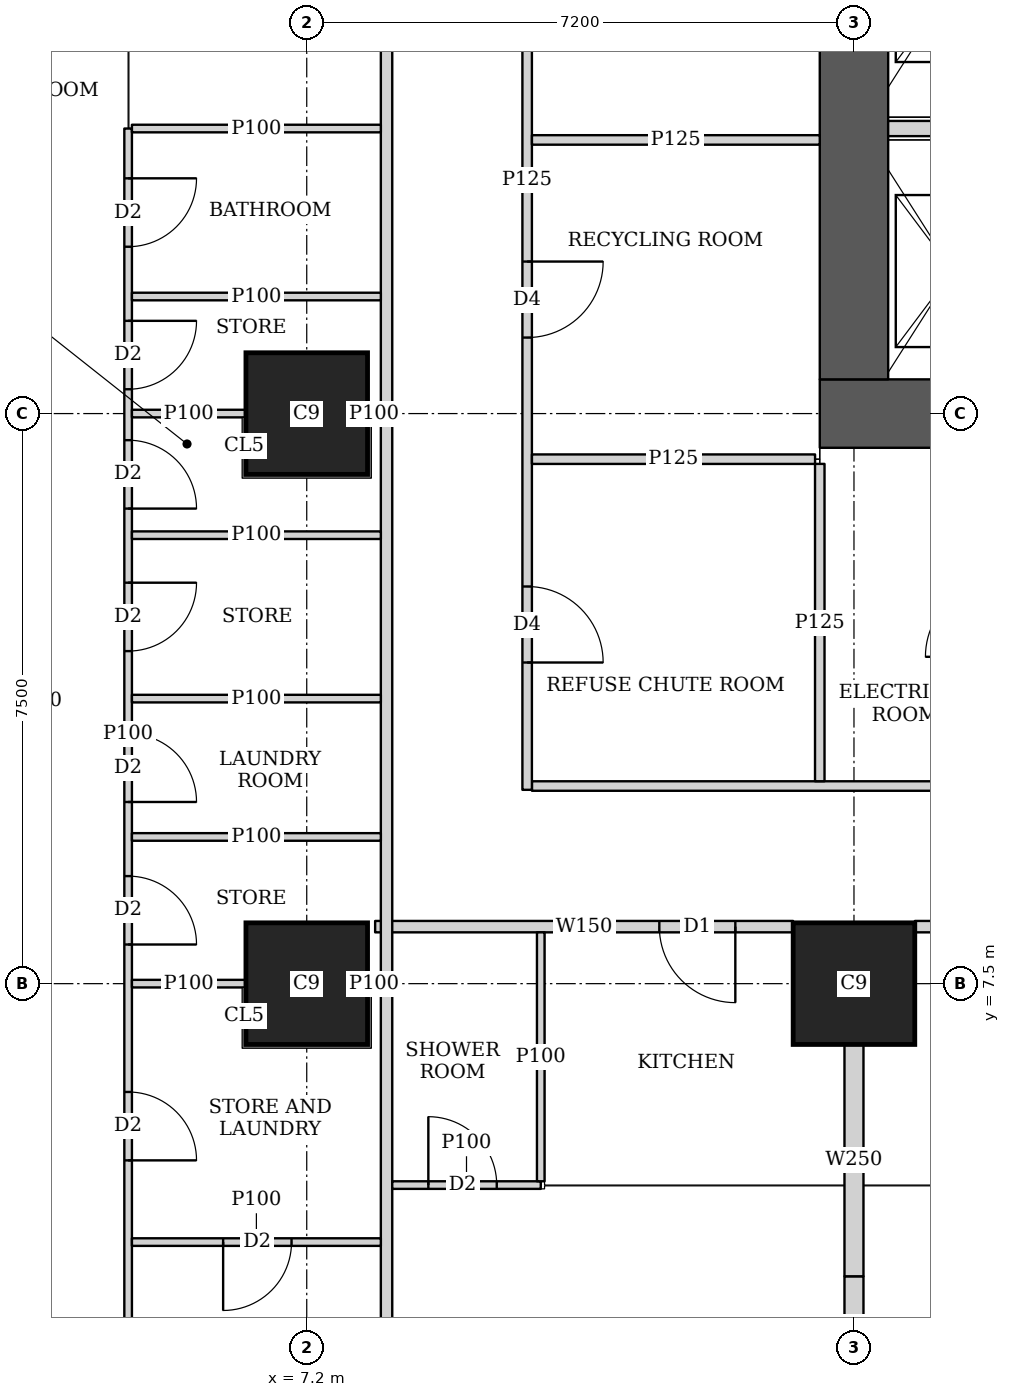
"""IFC4 building model, lengths in metres.
Left out: names, types, materials, properties, quantities, classifications, styles, units other than length and angle.
Written with IfcOpenShell. Run it as: python <this file> out.ifc"""

import sys

from ifc_helpers import new_model, si_unit, direction, frame, frame_2d, origin, origin_2d, place, context, subcontext, project, spatial, rectangle, extrude, element, fill, save


model = new_model("IFC4")
c1 = context("Model", 3, precision=1e-05, world=origin(), true_north=direction((0.0, 1.0)))
c2 = subcontext(c1, "Body", "Model", "MODEL_VIEW")
j1 = project(units=[si_unit("LENGTHUNIT", "METRE"), si_unit("PLANEANGLEUNIT", "RADIAN")], contexts=[c1])
p1 = place(None, origin())
s1 = spatial("IfcSite", under=j1, at=p1, CompositionType="ELEMENT")
p2 = place(p1, origin())
s2 = spatial("IfcBuilding", under=s1, at=p2, CompositionType="ELEMENT")
p3 = place(p2, frame((0.0, 0.0, 77.9)))
s3 = spatial("IfcBuildingStorey", under=s2, at=p3, CompositionType="ELEMENT", Elevation=77.9)
for number, where, z_axis, x_axis in (
    (1, (7.2, 7.5, 0.0), (0.0, 0.0, 1.0), (1.0, 0.0, 0.0)),
    (2, (14.4, 7.5, 0.0), (0.0, 0.0, 1.0), (1.0, 0.0, 0.0)),
    (3, (7.2, 15.0, 0.0), (0.0, 0.0, 1.0), (1.0, 0.0, 0.0)),
):
    element("IfcColumn", number, at=place(p3, frame(where, z_axis=z_axis, x_axis=x_axis)), inside=s3, PredefinedType="COLUMN", context=c2, shape_type="SweptSolid", body=[
        extrude(rectangle(XDim=1.6, YDim=1.6, at=origin_2d()), origin(), (0.0, 0.0, 1.0), 3.75),
    ])
p4 = place(p3, frame((13.95, 15.0, 0.0), z_axis=(0.0, 0.0, 1.0), x_axis=(1.0, 0.0, 0.0)))
e4 = element("IfcWall", 4, at=p4, inside=s3, PredefinedType="SHEAR", context=c2, shape_type="SweptSolid", body=[
    extrude(rectangle(XDim=15.3, YDim=0.9, at=frame_2d((7.65, 0.0))), origin(), (0.0, 0.0, 1.0), 3.75),
])
p5 = place(p4, frame((4.45, 0.0, 0.0)))
e5 = element("IfcOpeningElement", 5, at=p5, cuts=e4, PredefinedType="OPENING", context=c2, shape_type="SweptSolid", body=[
    extrude(rectangle(XDim=1.8, YDim=2.1, at=frame_2d((0.9, 1.05))), frame((0.0, 0.46, 0.0), z_axis=(0.0, -1.0, 0.0), x_axis=(1.0, 0.0, 0.0)), (0.0, 0.0, 1.0), 0.92),
])
p6 = place(p4, frame((10.7, 0.0, 0.0)))
e6 = element("IfcOpeningElement", 6, at=p6, cuts=e4, PredefinedType="OPENING", context=c2, shape_type="SweptSolid", body=[
    extrude(rectangle(XDim=1.1, YDim=2.1, at=frame_2d((0.55, 1.05))), frame((0.0, 0.46, 0.0), z_axis=(0.0, -1.0, 0.0), x_axis=(1.0, 0.0, 0.0)), (0.0, 0.0, 1.0), 0.92),
])
p7 = place(p3, frame((14.4, 15.45, 0.0), z_axis=(0.0, 0.0, 1.0), x_axis=(0.0, 1.0, 0.0)))
e7 = element("IfcWall", 7, at=p7, inside=s3, PredefinedType="SHEAR", context=c2, shape_type="SweptSolid", body=[
    extrude(rectangle(XDim=14.1, YDim=0.9, at=frame_2d((7.05, 0.0))), origin(), (0.0, 0.0, 1.0), 3.75),
])
p8 = place(p3, frame((8.25, 2.126, 0.0), z_axis=(0.0, 0.0, 1.0), x_axis=(0.0, 1.0, 0.0)))
e8 = element("IfcWall", 8, at=p8, inside=s3, PredefinedType="SOLIDWALL", context=c2, shape_type="SweptSolid", body=[
    extrude(rectangle(XDim=40.773, YDim=0.15, at=frame_2d((20.386, 0.0))), origin(), (0.0, 0.0, 1.0), 3.5),
])
p9 = place(p8, frame((17.787, 0.0, 0.0)))
e9 = element("IfcOpeningElement", 9, at=p9, cuts=e8, PredefinedType="OPENING", context=c2, shape_type="SweptSolid", body=[
    extrude(rectangle(XDim=1.0, YDim=2.1, at=frame_2d((0.5, 1.05))), frame((0.0, 0.085, 0.0), z_axis=(0.0, -1.0, 0.0), x_axis=(1.0, 0.0, 0.0)), (0.0, 0.0, 1.0), 0.17),
])
p10 = place(p8, frame((21.962, 0.0, 0.0)))
e10 = element("IfcOpeningElement", 10, at=p10, cuts=e8, PredefinedType="OPENING", context=c2, shape_type="SweptSolid", body=[
    extrude(rectangle(XDim=1.0, YDim=2.1, at=frame_2d((0.5, 1.05))), frame((0.0, 0.085, 0.0), z_axis=(0.0, -1.0, 0.0), x_axis=(1.0, 0.0, 0.0)), (0.0, 0.0, 1.0), 0.17),
])
p11 = place(p8, frame((32.787, 0.0, 0.0)))
e11 = element("IfcOpeningElement", 11, at=p11, cuts=e8, PredefinedType="OPENING", context=c2, shape_type="SweptSolid", body=[
    extrude(rectangle(XDim=1.0, YDim=2.1, at=frame_2d((0.5, 1.05))), frame((0.0, 0.085, 0.0), z_axis=(0.0, -1.0, 0.0), x_axis=(1.0, 0.0, 0.0)), (0.0, 0.0, 1.0), 0.17),
])
p12 = place(p3, frame((20.599, 8.25, 0.0), z_axis=(0.0, 0.0, 1.0), x_axis=(-1.0, 0.0, 0.0)))
e12 = element("IfcWall", 12, at=p12, inside=s3, PredefinedType="SOLIDWALL", context=c2, shape_type="SweptSolid", body=[
    extrude(rectangle(XDim=5.398, YDim=0.15, at=frame_2d((2.699, 0.0))), origin(), (0.0, 0.0, 1.0), 3.5),
])
p13 = place(p12, frame((3.699, 0.0, 0.0)))
e13 = element("IfcOpeningElement", 13, at=p13, cuts=e12, PredefinedType="OPENING", context=c2, shape_type="SweptSolid", body=[
    extrude(rectangle(XDim=1.0, YDim=2.1, at=frame_2d((0.5, 1.05))), frame((0.0, 0.085, 0.0), z_axis=(0.0, -1.0, 0.0), x_axis=(1.0, 0.0, 0.0)), (0.0, 0.0, 1.0), 0.17),
])
p14 = place(p3, frame((13.599, 8.25, 0.0), z_axis=(0.0, 0.0, 1.0), x_axis=(-1.0, 0.0, 0.0)))
e14 = element("IfcWall", 14, at=p14, inside=s3, PredefinedType="SOLIDWALL", context=c2, shape_type="SweptSolid", body=[
    extrude(rectangle(XDim=5.499, YDim=0.15, at=frame_2d((2.75, 0.0))), origin(), (0.0, 0.0, 1.0), 3.5),
])
p15 = place(p14, frame((0.76, 0.0, 0.0)))
e15 = element("IfcOpeningElement", 15, at=p15, cuts=e14, PredefinedType="OPENING", context=c2, shape_type="SweptSolid", body=[
    extrude(rectangle(XDim=1.0, YDim=2.1, at=frame_2d((0.5, 1.05))), frame((0.0, 0.085, 0.0), z_axis=(0.0, -1.0, 0.0), x_axis=(1.0, 0.0, 0.0)), (0.0, 0.0, 1.0), 0.17),
])
p16 = place(p3, frame((4.85, 2.812, 0.0), z_axis=(0.0, 0.0, 1.0), x_axis=(0.0, 1.0, 0.0)))
e16 = element("IfcWall", 16, at=p16, inside=s3, PredefinedType="PARTITIONING", context=c2, shape_type="SweptSolid", body=[
    extrude(rectangle(XDim=15.938, YDim=0.1, at=frame_2d((7.969, 0.0))), origin(), (0.0, 0.0, 1.0), 3.5),
])
p17 = place(p16, frame((14.383, 0.0, 0.0)))
e17 = element("IfcOpeningElement", 17, at=p17, cuts=e16, PredefinedType="OPENING", context=c2, shape_type="SweptSolid", body=[
    extrude(rectangle(XDim=0.9, YDim=2.1, at=frame_2d((0.45, 1.05))), frame((0.0, 0.06, 0.0), z_axis=(0.0, -1.0, 0.0), x_axis=(1.0, 0.0, 0.0)), (0.0, 0.0, 1.0), 0.12),
])
p18 = place(p16, frame((10.938, 0.0, 0.0)))
e18 = element("IfcOpeningElement", 18, at=p18, cuts=e16, PredefinedType="OPENING", context=c2, shape_type="SweptSolid", body=[
    extrude(rectangle(XDim=0.9, YDim=2.1, at=frame_2d((0.45, 1.05))), frame((0.0, 0.06, 0.0), z_axis=(0.0, -1.0, 0.0), x_axis=(1.0, 0.0, 0.0)), (0.0, 0.0, 1.0), 0.12),
])
p19 = place(p16, frame((7.078, 0.0, 0.0)))
e19 = element("IfcOpeningElement", 19, at=p19, cuts=e16, PredefinedType="OPENING", context=c2, shape_type="SweptSolid", body=[
    extrude(rectangle(XDim=0.9, YDim=2.1, at=frame_2d((0.45, 1.05))), frame((0.0, 0.06, 0.0), z_axis=(0.0, -1.0, 0.0), x_axis=(1.0, 0.0, 0.0)), (0.0, 0.0, 1.0), 0.12),
])
p20 = place(p16, frame((2.363, 0.0, 0.0)))
e20 = element("IfcOpeningElement", 20, at=p20, cuts=e16, PredefinedType="OPENING", context=c2, shape_type="SweptSolid", body=[
    extrude(rectangle(XDim=0.9, YDim=2.1, at=frame_2d((0.45, 1.05))), frame((0.0, 0.06, 0.0), z_axis=(0.0, -1.0, 0.0), x_axis=(1.0, 0.0, 0.0)), (0.0, 0.0, 1.0), 0.12),
])
p21 = place(p16, frame((12.508, 0.0, 0.0)))
e21 = element("IfcOpeningElement", 21, at=p21, cuts=e16, PredefinedType="OPENING", context=c2, shape_type="SweptSolid", body=[
    extrude(rectangle(XDim=0.9, YDim=2.1, at=frame_2d((0.45, 1.05))), frame((0.0, 0.06, 0.0), z_axis=(0.0, -1.0, 0.0), x_axis=(1.0, 0.0, 0.0)), (0.0, 0.0, 1.0), 0.12),
])
p22 = place(p16, frame((9.063, 0.0, 0.0)))
e22 = element("IfcOpeningElement", 22, at=p22, cuts=e16, PredefinedType="OPENING", context=c2, shape_type="SweptSolid", body=[
    extrude(rectangle(XDim=0.9, YDim=2.1, at=frame_2d((0.45, 1.05))), frame((0.0, 0.06, 0.0), z_axis=(0.0, -1.0, 0.0), x_axis=(1.0, 0.0, 0.0)), (0.0, 0.0, 1.0), 0.12),
])
p23 = place(p16, frame((5.203, 0.0, 0.0)))
e23 = element("IfcOpeningElement", 23, at=p23, cuts=e16, PredefinedType="OPENING", context=c2, shape_type="SweptSolid", body=[
    extrude(rectangle(XDim=0.9, YDim=2.1, at=frame_2d((0.45, 1.05))), frame((0.0, 0.06, 0.0), z_axis=(0.0, -1.0, 0.0), x_axis=(1.0, 0.0, 0.0)), (0.0, 0.0, 1.0), 0.12),
])
p24 = place(p3, frame((4.9, 7.5, 0.0), z_axis=(0.0, 0.0, 1.0), x_axis=(1.0, 0.0, 0.0)))
e24 = element("IfcWall", 24, at=p24, inside=s3, PredefinedType="PARTITIONING", context=c2, shape_type="SweptSolid", body=[
    extrude(rectangle(XDim=1.499, YDim=0.1, at=frame_2d((0.75, 0.0))), origin(), (0.0, 0.0, 1.0), 3.5),
])
p25 = place(p3, frame((8.001, 7.5, 0.0), z_axis=(0.0, 0.0, 1.0), x_axis=(1.0, 0.0, 0.0)))
e25 = element("IfcWall", 25, at=p25, inside=s3, PredefinedType="PARTITIONING", context=c2, shape_type="SweptSolid", body=[
    extrude(rectangle(XDim=0.174, YDim=0.1, at=frame_2d((0.087, 0.0))), origin(), (0.0, 0.0, 1.0), 3.5),
])
p26 = place(p3, frame((4.9, 11.25, 0.0), z_axis=(0.0, 0.0, 1.0), x_axis=(1.0, 0.0, 0.0)))
e26 = element("IfcWall", 26, at=p26, inside=s3, PredefinedType="PARTITIONING", context=c2, shape_type="SweptSolid", body=[
    extrude(rectangle(XDim=3.275, YDim=0.1, at=frame_2d((1.638, 0.0))), origin(), (0.0, 0.0, 1.0), 3.5),
])
p27 = place(p3, frame((4.9, 15.0, 0.0), z_axis=(0.0, 0.0, 1.0), x_axis=(1.0, 0.0, 0.0)))
e27 = element("IfcWall", 27, at=p27, inside=s3, PredefinedType="PARTITIONING", context=c2, shape_type="SweptSolid", body=[
    extrude(rectangle(XDim=1.499, YDim=0.1, at=frame_2d((0.75, 0.0))), origin(), (0.0, 0.0, 1.0), 3.5),
])
p28 = place(p3, frame((8.001, 15.0, 0.0), z_axis=(0.0, 0.0, 1.0), x_axis=(1.0, 0.0, 0.0)))
e28 = element("IfcWall", 28, at=p28, inside=s3, PredefinedType="PARTITIONING", context=c2, shape_type="SweptSolid", body=[
    extrude(rectangle(XDim=0.174, YDim=0.1, at=frame_2d((0.087, 0.0))), origin(), (0.0, 0.0, 1.0), 3.5),
])
for number, where, z_axis, x_axis in (
    (29, (4.9, 18.75, 0.0), (0.0, 0.0, 1.0), (1.0, 0.0, 0.0)),
    (30, (4.9, 16.54, 0.0), (0.0, 0.0, 1.0), (1.0, 0.0, 0.0)),
    (31, (4.9, 13.4, 0.0), (0.0, 0.0, 1.0), (1.0, 0.0, 0.0)),
    (32, (4.9, 9.43, 0.0), (0.0, 0.0, 1.0), (1.0, 0.0, 0.0)),
):
    element("IfcWall", number, at=place(p3, frame(where, z_axis=z_axis, x_axis=x_axis)), inside=s3, PredefinedType="PARTITIONING", context=c2, shape_type="SweptSolid", body=[
        extrude(rectangle(XDim=3.275, YDim=0.1, at=frame_2d((1.638, 0.0))), origin(), (0.0, 0.0, 1.0), 3.5),
    ])
p29 = place(p3, frame((10.279, 4.85, 0.0), z_axis=(0.0, 0.0, 1.0), x_axis=(-1.0, 0.0, 0.0)))
e33 = element("IfcWall", 33, at=p29, inside=s3, PredefinedType="PARTITIONING", context=c2, shape_type="SweptSolid", body=[
    extrude(rectangle(XDim=1.954, YDim=0.1, at=frame_2d((0.977, 0.0))), origin(), (0.0, 0.0, 1.0), 3.5),
])
p30 = place(p29, frame((0.579, 0.0, 0.0)))
e34 = element("IfcOpeningElement", 34, at=p30, cuts=e33, PredefinedType="OPENING", context=c2, shape_type="SweptSolid", body=[
    extrude(rectangle(XDim=0.9, YDim=2.1, at=frame_2d((0.45, 1.05))), frame((0.0, 0.06, 0.0), z_axis=(0.0, -1.0, 0.0), x_axis=(1.0, 0.0, 0.0)), (0.0, 0.0, 1.0), 0.12),
])
p31 = place(p3, frame((10.279, 4.9, 0.0), z_axis=(0.0, 0.0, 1.0), x_axis=(0.0, 1.0, 0.0)))
e35 = element("IfcWall", 35, at=p31, inside=s3, PredefinedType="PARTITIONING", context=c2, shape_type="SweptSolid", body=[
    extrude(rectangle(XDim=3.275, YDim=0.1, at=frame_2d((1.638, 0.0))), origin(), (0.0, 0.0, 1.0), 3.5),
])
p32 = place(p3, frame((14.4, 2.326, 0.0), z_axis=(0.0, 0.0, 1.0), x_axis=(0.0, 1.0, 0.0)))
e36 = element("IfcWall", 36, at=p32, inside=s3, PredefinedType="SOLIDWALL", context=c2, shape_type="SweptSolid", body=[
    extrude(rectangle(XDim=1.324, YDim=0.25, at=frame_2d((0.662, 0.0))), origin(), (0.0, 0.0, 1.0), 3.5),
])
p33 = place(p3, frame((14.4, 3.65, 0.0), z_axis=(0.0, 0.0, 1.0), x_axis=(0.0, 1.0, 0.0)))
e37 = element("IfcWall", 37, at=p33, inside=s3, PredefinedType="SOLIDWALL", context=c2, shape_type="SweptSolid", body=[
    extrude(rectangle(XDim=3.049, YDim=0.25, at=frame_2d((1.524, 0.0))), origin(), (0.0, 0.0, 1.0), 3.5),
])
p34 = place(p3, frame((8.175, 4.1, 0.0), z_axis=(0.0, 0.0, 1.0), x_axis=(-1.0, 0.0, 0.0)))
e38 = element("IfcWall", 38, at=p34, inside=s3, PredefinedType="PARTITIONING", context=c2, shape_type="SweptSolid", body=[
    extrude(rectangle(XDim=3.275, YDim=0.1, at=frame_2d((1.638, 0.0))), origin(), (0.0, 0.0, 1.0), 3.5),
])
p35 = place(p34, frame((1.175, 0.0, 0.0)))
e39 = element("IfcOpeningElement", 39, at=p35, cuts=e38, PredefinedType="OPENING", context=c2, shape_type="SweptSolid", body=[
    extrude(rectangle(XDim=0.9, YDim=2.1, at=frame_2d((0.45, 1.05))), frame((0.0, 0.06, 0.0), z_axis=(0.0, -1.0, 0.0), x_axis=(1.0, 0.0, 0.0)), (0.0, 0.0, 1.0), 0.12),
])
p36 = place(p3, frame((10.1, 10.05, 0.0), z_axis=(0.0, 0.0, 1.0), x_axis=(0.0, 1.0, 0.0)))
e40 = element("IfcWall", 40, at=p36, inside=s3, PredefinedType="PARTITIONING", context=c2, shape_type="SweptSolid", body=[
    extrude(rectangle(XDim=16.05, YDim=0.125, at=frame_2d((8.025, 0.0))), origin(), (0.0, 0.0, 1.0), 3.5),
])
p37 = place(p36, frame((1.675, 0.0, 0.0)))
e41 = element("IfcOpeningElement", 41, at=p37, cuts=e40, PredefinedType="OPENING", context=c2, shape_type="SweptSolid", body=[
    extrude(rectangle(XDim=1.0, YDim=2.1, at=frame_2d((0.5, 1.05))), frame((0.0, 0.073, 0.0), z_axis=(0.0, -1.0, 0.0), x_axis=(1.0, 0.0, 0.0)), (0.0, 0.0, 1.0), 0.145),
])
p38 = place(p36, frame((5.95, 0.0, 0.0)))
e42 = element("IfcOpeningElement", 42, at=p38, cuts=e40, PredefinedType="OPENING", context=c2, shape_type="SweptSolid", body=[
    extrude(rectangle(XDim=1.0, YDim=2.1, at=frame_2d((0.5, 1.05))), frame((0.0, 0.073, 0.0), z_axis=(0.0, -1.0, 0.0), x_axis=(1.0, 0.0, 0.0)), (0.0, 0.0, 1.0), 0.145),
])
p39 = place(p36, frame((11.8, 0.0, 0.0)))
e43 = element("IfcOpeningElement", 43, at=p39, cuts=e40, PredefinedType="OPENING", context=c2, shape_type="SweptSolid", body=[
    extrude(rectangle(XDim=1.0, YDim=2.1, at=frame_2d((0.5, 1.05))), frame((0.0, 0.073, 0.0), z_axis=(0.0, -1.0, 0.0), x_axis=(1.0, 0.0, 0.0)), (0.0, 0.0, 1.0), 0.145),
])
p40 = place(p3, frame((10.163, 14.4, 0.0), z_axis=(0.0, 0.0, 1.0), x_axis=(1.0, 0.0, 0.0)))
e44 = element("IfcWall", 44, at=p40, inside=s3, PredefinedType="PARTITIONING", context=c2, shape_type="SweptSolid", body=[
    extrude(rectangle(XDim=3.725, YDim=0.125, at=frame_2d((1.862, 0.0))), origin(), (0.0, 0.0, 1.0), 3.5),
])
p41 = place(p3, frame((10.163, 18.6, 0.0), z_axis=(0.0, 0.0, 1.0), x_axis=(1.0, 0.0, 0.0)))
e45 = element("IfcWall", 45, at=p41, inside=s3, PredefinedType="PARTITIONING", context=c2, shape_type="SweptSolid", body=[
    extrude(rectangle(XDim=3.787, YDim=0.125, at=frame_2d((1.894, 0.0))), origin(), (0.0, 0.0, 1.0), 3.5),
])
p42 = place(p3, frame((13.95, 10.163, 0.0), z_axis=(0.0, 0.0, 1.0), x_axis=(0.0, 1.0, 0.0)))
e46 = element("IfcWall", 46, at=p42, inside=s3, PredefinedType="PARTITIONING", context=c2, shape_type="SweptSolid", body=[
    extrude(rectangle(XDim=4.175, YDim=0.125, at=frame_2d((2.087, 0.0))), origin(), (0.0, 0.0, 1.0), 3.5),
])
p43 = place(p3, frame((10.163, 10.1, 0.0), z_axis=(0.0, 0.0, 1.0), x_axis=(1.0, 0.0, 0.0)))
e47 = element("IfcWall", 47, at=p43, inside=s3, PredefinedType="PARTITIONING", context=c2, shape_type="SweptSolid", body=[
    extrude(rectangle(XDim=11.287, YDim=0.125, at=frame_2d((5.644, 0.0))), origin(), (0.0, 0.0, 1.0), 3.5),
])
p44 = place(p43, frame((7.832, 0.0, 0.0)))
e48 = element("IfcOpeningElement", 48, at=p44, cuts=e47, PredefinedType="OPENING", context=c2, shape_type="SweptSolid", body=[
    extrude(rectangle(XDim=1.8, YDim=2.1, at=frame_2d((0.9, 1.05))), frame((0.0, 0.073, 0.0), z_axis=(0.0, -1.0, 0.0), x_axis=(1.0, 0.0, 0.0)), (0.0, 0.0, 1.0), 0.145),
])
p45 = place(p3, frame((14.85, 18.75, 0.0), z_axis=(0.0, 0.0, 1.0), x_axis=(1.0, 0.0, 0.0)))
e49 = element("IfcWall", 49, at=p45, inside=s3, PredefinedType="SOLIDWALL", context=c2, shape_type="SweptSolid", body=[
    extrude(rectangle(XDim=1.95, YDim=0.2, at=frame_2d((0.975, 0.0))), origin(), (0.0, 0.0, 1.0), 3.5),
])
p46 = place(p17, origin())
e50 = element("IfcDoor", 50, at=p46, inside=s3, OperationType="SINGLE_SWING_LEFT", PredefinedType="DOOR", context=c2, shape_type="SweptSolid", body=[
    extrude(rectangle(XDim=0.9, YDim=2.1, at=frame_2d((0.45, 1.05))), frame((0.0, 0.025, 0.0), z_axis=(0.0, -1.0, 0.0), x_axis=(1.0, 0.0, 0.0)), (0.0, 0.0, 1.0), 0.05),
])
fill(e17, e50)
p47 = place(p18, origin())
e51 = element("IfcDoor", 51, at=p47, inside=s3, OperationType="SINGLE_SWING_RIGHT", PredefinedType="DOOR", context=c2, shape_type="SweptSolid", body=[
    extrude(rectangle(XDim=0.9, YDim=2.1, at=frame_2d((0.45, 1.05))), frame((0.0, 0.025, 0.0), z_axis=(0.0, -1.0, 0.0), x_axis=(1.0, 0.0, 0.0)), (0.0, 0.0, 1.0), 0.05),
])
fill(e18, e51)
p48 = place(p19, origin())
e52 = element("IfcDoor", 52, at=p48, inside=s3, OperationType="SINGLE_SWING_RIGHT", PredefinedType="DOOR", context=c2, shape_type="SweptSolid", body=[
    extrude(rectangle(XDim=0.9, YDim=2.1, at=frame_2d((0.45, 1.05))), frame((0.0, 0.025, 0.0), z_axis=(0.0, -1.0, 0.0), x_axis=(1.0, 0.0, 0.0)), (0.0, 0.0, 1.0), 0.05),
])
fill(e19, e52)
p49 = place(p20, origin())
e53 = element("IfcDoor", 53, at=p49, inside=s3, OperationType="SINGLE_SWING_RIGHT", PredefinedType="DOOR", context=c2, shape_type="SweptSolid", body=[
    extrude(rectangle(XDim=0.9, YDim=2.1, at=frame_2d((0.45, 1.05))), frame((0.0, 0.025, 0.0), z_axis=(0.0, -1.0, 0.0), x_axis=(1.0, 0.0, 0.0)), (0.0, 0.0, 1.0), 0.05),
])
fill(e20, e53)
p50 = place(p21, origin())
e54 = element("IfcDoor", 54, at=p50, inside=s3, OperationType="SINGLE_SWING_LEFT", PredefinedType="DOOR", context=c2, shape_type="SweptSolid", body=[
    extrude(rectangle(XDim=0.9, YDim=2.1, at=frame_2d((0.45, 1.05))), frame((0.0, 0.025, 0.0), z_axis=(0.0, -1.0, 0.0), x_axis=(1.0, 0.0, 0.0)), (0.0, 0.0, 1.0), 0.05),
])
fill(e21, e54)
p51 = place(p22, origin())
e55 = element("IfcDoor", 55, at=p51, inside=s3, OperationType="SINGLE_SWING_LEFT", PredefinedType="DOOR", context=c2, shape_type="SweptSolid", body=[
    extrude(rectangle(XDim=0.9, YDim=2.1, at=frame_2d((0.45, 1.05))), frame((0.0, 0.025, 0.0), z_axis=(0.0, -1.0, 0.0), x_axis=(1.0, 0.0, 0.0)), (0.0, 0.0, 1.0), 0.05),
])
fill(e22, e55)
p52 = place(p23, origin())
e56 = element("IfcDoor", 56, at=p52, inside=s3, OperationType="SINGLE_SWING_RIGHT", PredefinedType="DOOR", context=c2, shape_type="SweptSolid", body=[
    extrude(rectangle(XDim=0.9, YDim=2.1, at=frame_2d((0.45, 1.05))), frame((0.0, 0.025, 0.0), z_axis=(0.0, -1.0, 0.0), x_axis=(1.0, 0.0, 0.0)), (0.0, 0.0, 1.0), 0.05),
])
fill(e23, e56)
p53 = place(p30, origin())
e57 = element("IfcDoor", 57, at=p53, inside=s3, OperationType="SINGLE_SWING_LEFT", PredefinedType="DOOR", context=c2, shape_type="SweptSolid", body=[
    extrude(rectangle(XDim=0.9, YDim=2.1, at=frame_2d((0.45, 1.05))), frame((0.0, 0.025, 0.0), z_axis=(0.0, -1.0, 0.0), x_axis=(1.0, 0.0, 0.0)), (0.0, 0.0, 1.0), 0.05),
])
fill(e34, e57)
p54 = place(p15, origin())
e58 = element("IfcDoor", 58, at=p54, inside=s3, OperationType="SINGLE_SWING_LEFT", PredefinedType="DOOR", context=c2, shape_type="SweptSolid", body=[
    extrude(rectangle(XDim=1.0, YDim=2.1, at=frame_2d((0.5, 1.05))), frame((0.0, 0.025, 0.0), z_axis=(0.0, -1.0, 0.0), x_axis=(1.0, 0.0, 0.0)), (0.0, 0.0, 1.0), 0.05),
])
fill(e15, e58)
p55 = place(p35, origin())
e59 = element("IfcDoor", 59, at=p55, inside=s3, OperationType="SINGLE_SWING_RIGHT", PredefinedType="DOOR", context=c2, shape_type="SweptSolid", body=[
    extrude(rectangle(XDim=0.9, YDim=2.1, at=frame_2d((0.45, 1.05))), frame((0.0, 0.025, 0.0), z_axis=(0.0, -1.0, 0.0), x_axis=(1.0, 0.0, 0.0)), (0.0, 0.0, 1.0), 0.05),
])
fill(e39, e59)
p56 = place(p37, origin())
e60 = element("IfcDoor", 60, at=p56, inside=s3, OperationType="SINGLE_SWING_RIGHT", PredefinedType="DOOR", context=c2, shape_type="SweptSolid", body=[
    extrude(rectangle(XDim=1.0, YDim=2.1, at=frame_2d((0.5, 1.05))), frame((0.0, 0.025, 0.0), z_axis=(0.0, -1.0, 0.0), x_axis=(1.0, 0.0, 0.0)), (0.0, 0.0, 1.0), 0.05),
])
fill(e41, e60)
p57 = place(p38, origin())
e61 = element("IfcDoor", 61, at=p57, inside=s3, OperationType="SINGLE_SWING_LEFT", PredefinedType="DOOR", context=c2, shape_type="SweptSolid", body=[
    extrude(rectangle(XDim=1.0, YDim=2.1, at=frame_2d((0.5, 1.05))), frame((0.0, 0.025, 0.0), z_axis=(0.0, -1.0, 0.0), x_axis=(1.0, 0.0, 0.0)), (0.0, 0.0, 1.0), 0.05),
])
fill(e42, e61)
save(model, sys.argv[1])
